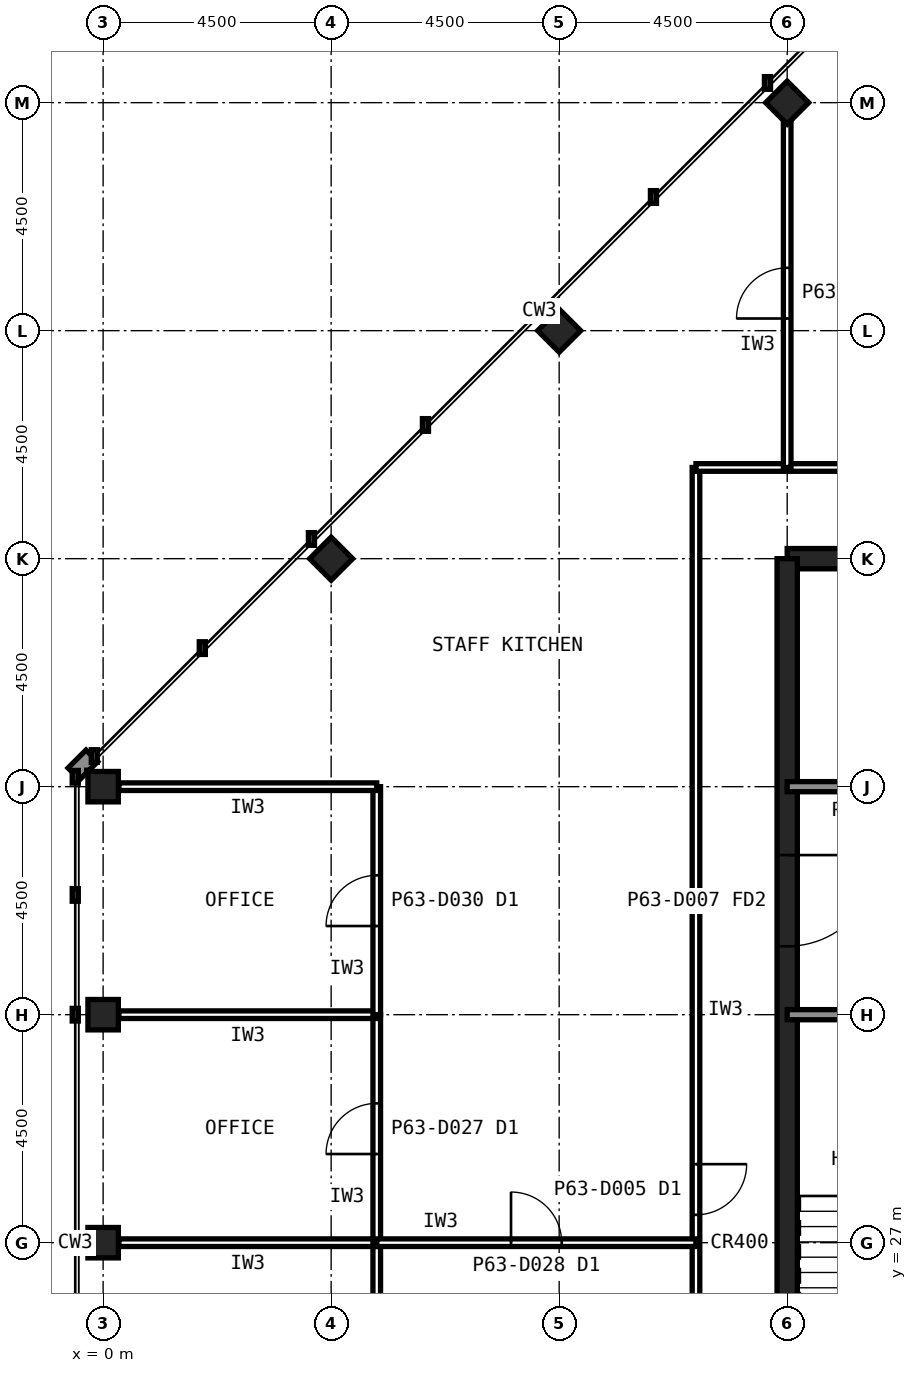
"""IFC4 building model, lengths in metres.
Left out: names, types, materials, properties, quantities, classifications, styles, units other than length and angle.
Written with IfcOpenShell. Run it as: python <this file> out.ifc"""

import sys

from ifc_helpers import new_model, si_unit, direction, frame, frame_2d, origin, origin_2d, place, context, subcontext, project, spatial, rectangle, hollow_rectangle, extrude, element, fill, save


model = new_model("IFC4")
c1 = context("Model", 3, precision=1e-05, world=origin(), true_north=direction((0.0, 1.0)))
c2 = subcontext(c1, "Body", "Model", "MODEL_VIEW")
j1 = project(units=[si_unit("LENGTHUNIT", "METRE"), si_unit("PLANEANGLEUNIT", "RADIAN")], contexts=[c1])
p1 = place(None, origin())
s1 = spatial("IfcSite", under=j1, at=p1, CompositionType="ELEMENT")
p2 = place(p1, origin())
s2 = spatial("IfcBuilding", under=s1, at=p2, CompositionType="ELEMENT")
p3 = place(p2, frame((0.0, 0.0, 262.6)))
s3 = spatial("IfcBuildingStorey", under=s2, at=p3, CompositionType="ELEMENT", Elevation=262.6)
for number, where, z_axis, x_axis in (
    (1, (0.0, 36.0, 0.0), (0.0, 0.0, 1.0), (1.0, 0.0, 0.0)),
    (2, (0.0, 31.5, 0.0), (0.0, 0.0, 1.0), (1.0, 0.0, 0.0)),
    (3, (0.0, 27.0, 0.0), (0.0, 0.0, 1.0), (1.0, 0.0, 0.0)),
    (4, (4.5, 40.5, 0.0), (0.0, 0.0, 1.0), (0.707, 0.707, 0.0)),
    (5, (9.0, 45.0, 0.0), (0.0, 0.0, 1.0), (0.707, 0.707, 0.0)),
    (6, (13.5, 49.5, 0.0), (0.0, 0.0, 1.0), (0.707, 0.707, 0.0)),
):
    element("IfcColumn", number, at=place(p3, frame(where, z_axis=z_axis, x_axis=x_axis)), inside=s3, PredefinedType="COLUMN", context=c2, shape_type="SweptSolid", body=[
        extrude(hollow_rectangle(XDim=0.6, YDim=0.6, WallThickness=0.028, at=origin_2d()), origin(), (0.0, 0.0, 1.0), 4.0),
    ])
p4 = place(p3, frame((40.5, 40.5, 0.0), z_axis=(0.0, 0.0, 1.0), x_axis=(-1.0, 0.0, 0.0)))
e7 = element("IfcWall", 7, at=p4, inside=s3, PredefinedType="SHEAR", context=c2, shape_type="SweptSolid", body=[
    extrude(rectangle(XDim=27.0, YDim=0.4, at=frame_2d((13.5, 0.0))), origin(), (0.0, 0.0, 1.0), 4.0),
])
p5 = place(p3, frame((13.5, 40.5, 0.0), z_axis=(0.0, 0.0, 1.0), x_axis=(0.0, -1.0, 0.0)))
e8 = element("IfcWall", 8, at=p5, inside=s3, PredefinedType="SHEAR", context=c2, shape_type="SweptSolid", body=[
    extrude(rectangle(XDim=27.0, YDim=0.4, at=frame_2d((13.5, 0.0))), origin(), (0.0, 0.0, 1.0), 4.0),
])
p6 = place(p5, frame((19.65, 0.0, 0.0)))
e9 = element("IfcOpeningElement", 9, at=p6, cuts=e8, PredefinedType="OPENING", context=c2, shape_type="SweptSolid", body=[
    extrude(rectangle(XDim=1.2, YDim=2.1, at=frame_2d((0.6, 1.05))), frame((0.0, 0.21, 0.0), z_axis=(0.0, -1.0, 0.0), x_axis=(1.0, 0.0, 0.0)), (0.0, 0.0, 1.0), 0.42),
])
p7 = place(p5, frame((5.85, 0.0, 0.0)))
e10 = element("IfcOpeningElement", 10, at=p7, cuts=e8, PredefinedType="OPENING", context=c2, shape_type="SweptSolid", body=[
    extrude(rectangle(XDim=1.8, YDim=2.1, at=frame_2d((0.9, 1.05))), frame((0.0, 0.21, 0.0), z_axis=(0.0, -1.0, 0.0), x_axis=(1.0, 0.0, 0.0)), (0.0, 0.0, 1.0), 0.42),
])
p8 = place(p3, frame((13.5, 36.0, 0.0), z_axis=(0.0, 0.0, 1.0), x_axis=(1.0, 0.0, 0.0)))
e11 = element("IfcWall", 11, at=p8, inside=s3, PredefinedType="SOLIDWALL", context=c2, shape_type="SweptSolid", body=[
    extrude(rectangle(XDim=27.0, YDim=0.2, at=frame_2d((13.5, 0.0))), origin(), (0.0, 0.0, 1.0), 3.84),
])
p9 = place(p8, frame((1.8, 0.0, 0.0)))
e12 = element("IfcOpeningElement", 12, at=p9, cuts=e11, PredefinedType="OPENING", context=c2, shape_type="SweptSolid", body=[
    extrude(rectangle(XDim=0.9, YDim=2.1, at=frame_2d((0.45, 1.05))), frame((0.0, 0.11, 0.0), z_axis=(0.0, -1.0, 0.0), x_axis=(1.0, 0.0, 0.0)), (0.0, 0.0, 1.0), 0.22),
])
p10 = place(p8, frame((5.55, 0.0, 0.0)))
e13 = element("IfcOpeningElement", 13, at=p10, cuts=e11, PredefinedType="OPENING", context=c2, shape_type="SweptSolid", body=[
    extrude(rectangle(XDim=0.9, YDim=2.1, at=frame_2d((0.45, 1.05))), frame((0.0, 0.11, 0.0), z_axis=(0.0, -1.0, 0.0), x_axis=(1.0, 0.0, 0.0)), (0.0, 0.0, 1.0), 0.22),
])
p11 = place(p8, frame((11.55, 0.0, 0.0)))
e14 = element("IfcOpeningElement", 14, at=p11, cuts=e11, PredefinedType="OPENING", context=c2, shape_type="SweptSolid", body=[
    extrude(rectangle(XDim=0.9, YDim=2.1, at=frame_2d((0.45, 1.05))), frame((0.0, 0.11, 0.0), z_axis=(0.0, -1.0, 0.0), x_axis=(1.0, 0.0, 0.0)), (0.0, 0.0, 1.0), 0.22),
])
p12 = place(p8, frame((14.55, 0.0, 0.0)))
e15 = element("IfcOpeningElement", 15, at=p12, cuts=e11, PredefinedType="OPENING", context=c2, shape_type="SweptSolid", body=[
    extrude(rectangle(XDim=0.9, YDim=2.1, at=frame_2d((0.45, 1.05))), frame((0.0, 0.11, 0.0), z_axis=(0.0, -1.0, 0.0), x_axis=(1.0, 0.0, 0.0)), (0.0, 0.0, 1.0), 0.22),
])
p13 = place(p8, frame((24.1, 0.0, 0.0)))
e16 = element("IfcOpeningElement", 16, at=p13, cuts=e11, PredefinedType="OPENING", context=c2, shape_type="SweptSolid", body=[
    extrude(rectangle(XDim=1.3, YDim=2.2, at=frame_2d((0.65, 1.1))), frame((0.0, 0.11, 0.0), z_axis=(0.0, -1.0, 0.0), x_axis=(1.0, 0.0, 0.0)), (0.0, 0.0, 1.0), 0.22),
])
p14 = place(p3, frame((13.5, 31.5, 0.0), z_axis=(0.0, 0.0, 1.0), x_axis=(1.0, 0.0, 0.0)))
e17 = element("IfcWall", 17, at=p14, inside=s3, PredefinedType="SOLIDWALL", context=c2, shape_type="SweptSolid", body=[
    extrude(rectangle(XDim=27.0, YDim=0.2, at=frame_2d((13.5, 0.0))), origin(), (0.0, 0.0, 1.0), 3.84),
])
p15 = place(p14, frame((24.15, 0.0, 0.0)))
e18 = element("IfcOpeningElement", 18, at=p15, cuts=e17, PredefinedType="OPENING", context=c2, shape_type="SweptSolid", body=[
    extrude(rectangle(XDim=1.2, YDim=2.1, at=frame_2d((0.6, 1.05))), frame((0.0, 0.11, 0.0), z_axis=(0.0, -1.0, 0.0), x_axis=(1.0, 0.0, 0.0)), (0.0, 0.0, 1.0), 0.22),
])
p16 = place(p14, frame((15.3, 0.0, 0.0)))
e19 = element("IfcOpeningElement", 19, at=p16, cuts=e17, PredefinedType="OPENING", context=c2, shape_type="SweptSolid", body=[
    extrude(rectangle(XDim=0.9, YDim=2.1, at=frame_2d((0.45, 1.05))), frame((0.0, 0.11, 0.0), z_axis=(0.0, -1.0, 0.0), x_axis=(1.0, 0.0, 0.0)), (0.0, 0.0, 1.0), 0.22),
])
p17 = place(p14, frame((19.8, 0.0, 0.0)))
e20 = element("IfcOpeningElement", 20, at=p17, cuts=e17, PredefinedType="OPENING", context=c2, shape_type="SweptSolid", body=[
    extrude(rectangle(XDim=0.9, YDim=2.1, at=frame_2d((0.45, 1.05))), frame((0.0, 0.11, 0.0), z_axis=(0.0, -1.0, 0.0), x_axis=(1.0, 0.0, 0.0)), (0.0, 0.0, 1.0), 0.22),
])
p18 = place(p3, frame((11.7, 42.3, 0.0), z_axis=(0.0, 0.0, 1.0), x_axis=(0.0, -1.0, 0.0)))
e21 = element("IfcWall", 21, at=p18, inside=s3, PredefinedType="PARTITIONING", context=c2, shape_type="SweptSolid", body=[
    extrude(rectangle(XDim=30.6, YDim=0.15, at=frame_2d((15.3, 0.0))), origin(), (0.0, 0.0, 1.0), 3.84),
])
p19 = place(p18, frame((13.75, 0.0, 0.0)))
e22 = element("IfcOpeningElement", 22, at=p19, cuts=e21, PredefinedType="OPENING", context=c2, shape_type="SweptSolid", body=[
    extrude(rectangle(XDim=1.0, YDim=2.1, at=frame_2d((0.5, 1.05))), frame((0.0, 0.085, 0.0), z_axis=(0.0, -1.0, 0.0), x_axis=(1.0, 0.0, 0.0)), (0.0, 0.0, 1.0), 0.17),
])
p20 = place(p3, frame((25.2, 42.3, 0.0), z_axis=(0.0, 0.0, 1.0), x_axis=(-1.0, 0.0, 0.0)))
e23 = element("IfcWall", 23, at=p20, inside=s3, PredefinedType="PARTITIONING", context=c2, shape_type="SweptSolid", body=[
    extrude(rectangle(XDim=13.5, YDim=0.15, at=frame_2d((6.75, 0.0))), origin(), (0.0, 0.0, 1.0), 3.84),
])
p21 = place(p20, frame((6.25, 0.0, 0.0)))
e24 = element("IfcOpeningElement", 24, at=p21, cuts=e23, PredefinedType="OPENING", context=c2, shape_type="SweptSolid", body=[
    extrude(rectangle(XDim=1.0, YDim=2.1, at=frame_2d((0.5, 1.05))), frame((0.0, 0.085, 0.0), z_axis=(0.0, -1.0, 0.0), x_axis=(1.0, 0.0, 0.0)), (0.0, 0.0, 1.0), 0.17),
])
p22 = place(p3, frame((5.4, 22.5, 0.0), z_axis=(0.0, 0.0, 1.0), x_axis=(0.0, 1.0, 0.0)))
e25 = element("IfcWall", 25, at=p22, inside=s3, PredefinedType="PARTITIONING", context=c2, shape_type="SweptSolid", body=[
    extrude(rectangle(XDim=4.5, YDim=0.15, at=frame_2d((2.25, 0.0))), origin(), (0.0, 0.0, 1.0), 3.84),
])
p23 = place(p22, frame((1.75, 0.0, 0.0)))
e26 = element("IfcOpeningElement", 26, at=p23, cuts=e25, PredefinedType="OPENING", context=c2, shape_type="SweptSolid", body=[
    extrude(rectangle(XDim=1.0, YDim=2.1, at=frame_2d((0.5, 1.05))), frame((0.0, 0.085, 0.0), z_axis=(0.0, -1.0, 0.0), x_axis=(1.0, 0.0, 0.0)), (0.0, 0.0, 1.0), 0.17),
])
p24 = place(p3, frame((5.4, 27.0, 0.0), z_axis=(0.0, 0.0, 1.0), x_axis=(-1.0, 0.0, 0.0)))
e27 = element("IfcWall", 27, at=p24, inside=s3, PredefinedType="PARTITIONING", context=c2, shape_type="SweptSolid", body=[
    extrude(rectangle(XDim=5.09, YDim=0.15, at=frame_2d((2.545, 0.0))), origin(), (0.0, 0.0, 1.0), 2.989),
])
p25 = place(p3, frame((5.4, 27.0, 0.0), z_axis=(0.0, 0.0, 1.0), x_axis=(0.0, 1.0, 0.0)))
e28 = element("IfcWall", 28, at=p25, inside=s3, PredefinedType="PARTITIONING", context=c2, shape_type="SweptSolid", body=[
    extrude(rectangle(XDim=4.5, YDim=0.15, at=frame_2d((2.25, 0.0))), origin(), (0.0, 0.0, 1.0), 3.84),
])
p26 = place(p25, frame((1.75, 0.0, 0.0)))
e29 = element("IfcOpeningElement", 29, at=p26, cuts=e28, PredefinedType="OPENING", context=c2, shape_type="SweptSolid", body=[
    extrude(rectangle(XDim=1.0, YDim=2.1, at=frame_2d((0.5, 1.05))), frame((0.0, 0.085, 0.0), z_axis=(0.0, -1.0, 0.0), x_axis=(1.0, 0.0, 0.0)), (0.0, 0.0, 1.0), 0.17),
])
p27 = place(p3, frame((5.4, 31.5, 0.0), z_axis=(0.0, 0.0, 1.0), x_axis=(-1.0, 0.0, 0.0)))
e30 = element("IfcWall", 30, at=p27, inside=s3, PredefinedType="PARTITIONING", context=c2, shape_type="SweptSolid", body=[
    extrude(rectangle(XDim=5.09, YDim=0.15, at=frame_2d((2.545, 0.0))), origin(), (0.0, 0.0, 1.0), 2.989),
])
p28 = place(p3, frame((5.4, 31.5, 0.0), z_axis=(0.0, 0.0, 1.0), x_axis=(0.0, 1.0, 0.0)))
e31 = element("IfcWall", 31, at=p28, inside=s3, PredefinedType="PARTITIONING", context=c2, shape_type="SweptSolid", body=[
    extrude(rectangle(XDim=4.5, YDim=0.15, at=frame_2d((2.25, 0.0))), origin(), (0.0, 0.0, 1.0), 3.84),
])
p29 = place(p28, frame((1.75, 0.0, 0.0)))
e32 = element("IfcOpeningElement", 32, at=p29, cuts=e31, PredefinedType="OPENING", context=c2, shape_type="SweptSolid", body=[
    extrude(rectangle(XDim=1.0, YDim=2.1, at=frame_2d((0.5, 1.05))), frame((0.0, 0.085, 0.0), z_axis=(0.0, -1.0, 0.0), x_axis=(1.0, 0.0, 0.0)), (0.0, 0.0, 1.0), 0.17),
])
p30 = place(p3, frame((5.4, 36.0, 0.0), z_axis=(0.0, 0.0, 1.0), x_axis=(-1.0, 0.0, 0.0)))
e33 = element("IfcWall", 33, at=p30, inside=s3, PredefinedType="PARTITIONING", context=c2, shape_type="SweptSolid", body=[
    extrude(rectangle(XDim=5.09, YDim=0.15, at=frame_2d((2.545, 0.0))), origin(), (0.0, 0.0, 1.0), 2.989),
])
p31 = place(p3, frame((13.5, 42.3, 0.0), z_axis=(0.0, 0.0, 1.0), x_axis=(0.0, 1.0, 0.0)))
e34 = element("IfcWall", 34, at=p31, inside=s3, PredefinedType="PARTITIONING", context=c2, shape_type="SweptSolid", body=[
    extrude(rectangle(XDim=6.88, YDim=0.15, at=frame_2d((3.44, 0.0))), origin(), (0.0, 0.0, 1.0), 2.989),
])
p32 = place(p31, frame((2.94, 0.0, 0.0)))
e35 = element("IfcOpeningElement", 35, at=p32, cuts=e34, PredefinedType="OPENING", context=c2, shape_type="SweptSolid", body=[
    extrude(rectangle(XDim=1.0, YDim=2.1, at=frame_2d((0.5, 1.05))), frame((0.0, 0.085, 0.0), z_axis=(0.0, -1.0, 0.0), x_axis=(1.0, 0.0, 0.0)), (0.0, 0.0, 1.0), 0.17),
])
p33 = place(p3, frame((5.4, 27.0, 0.0), z_axis=(0.0, 0.0, 1.0), x_axis=(1.0, 0.0, 0.0)))
e36 = element("IfcWall", 36, at=p33, inside=s3, PredefinedType="PARTITIONING", context=c2, shape_type="SweptSolid", body=[
    extrude(rectangle(XDim=6.3, YDim=0.15, at=frame_2d((3.15, 0.0))), origin(), (0.0, 0.0, 1.0), 2.989),
])
p34 = place(p33, frame((2.65, 0.0, 0.0)))
e37 = element("IfcOpeningElement", 37, at=p34, cuts=e36, PredefinedType="OPENING", context=c2, shape_type="SweptSolid", body=[
    extrude(rectangle(XDim=1.0, YDim=2.1, at=frame_2d((0.5, 1.05))), frame((0.0, 0.085, 0.0), z_axis=(0.0, -1.0, 0.0), x_axis=(1.0, 0.0, 0.0)), (0.0, 0.0, 1.0), 0.17),
])
p35 = place(p7, origin())
e38 = element("IfcDoor", 38, at=p35, inside=s3, OperationType="SINGLE_SWING_LEFT", PredefinedType="DOOR", context=c2, shape_type="SweptSolid", body=[
    extrude(rectangle(XDim=1.8, YDim=2.1, at=frame_2d((0.9, 1.05))), frame((0.0, 0.025, 0.0), z_axis=(0.0, -1.0, 0.0), x_axis=(1.0, 0.0, 0.0)), (0.0, 0.0, 1.0), 0.05),
])
fill(e10, e38)
p36 = place(p19, origin())
e39 = element("IfcDoor", 39, at=p36, inside=s3, OperationType="SINGLE_SWING_LEFT", PredefinedType="DOOR", context=c2, shape_type="SweptSolid", body=[
    extrude(rectangle(XDim=1.0, YDim=2.1, at=frame_2d((0.5, 1.05))), frame((0.0, 0.025, 0.0), z_axis=(0.0, -1.0, 0.0), x_axis=(1.0, 0.0, 0.0)), (0.0, 0.0, 1.0), 0.05),
])
fill(e22, e39)
p37 = place(p26, origin())
e40 = element("IfcDoor", 40, at=p37, inside=s3, OperationType="SINGLE_SWING_LEFT", PredefinedType="DOOR", context=c2, shape_type="SweptSolid", body=[
    extrude(rectangle(XDim=1.0, YDim=2.1, at=frame_2d((0.5, 1.05))), frame((0.0, 0.025, 0.0), z_axis=(0.0, -1.0, 0.0), x_axis=(1.0, 0.0, 0.0)), (0.0, 0.0, 1.0), 0.05),
])
fill(e29, e40)
p38 = place(p29, origin())
e41 = element("IfcDoor", 41, at=p38, inside=s3, OperationType="SINGLE_SWING_LEFT", PredefinedType="DOOR", context=c2, shape_type="SweptSolid", body=[
    extrude(rectangle(XDim=1.0, YDim=2.1, at=frame_2d((0.5, 1.05))), frame((0.0, 0.025, 0.0), z_axis=(0.0, -1.0, 0.0), x_axis=(1.0, 0.0, 0.0)), (0.0, 0.0, 1.0), 0.05),
])
fill(e32, e41)
p39 = place(p32, origin())
e42 = element("IfcDoor", 42, at=p39, inside=s3, OperationType="SINGLE_SWING_LEFT", PredefinedType="DOOR", context=c2, shape_type="SweptSolid", body=[
    extrude(rectangle(XDim=1.0, YDim=2.1, at=frame_2d((0.5, 1.05))), frame((0.0, 0.025, 0.0), z_axis=(0.0, -1.0, 0.0), x_axis=(1.0, 0.0, 0.0)), (0.0, 0.0, 1.0), 0.05),
])
fill(e35, e42)
p40 = place(p34, origin())
e43 = element("IfcDoor", 43, at=p40, inside=s3, OperationType="SINGLE_SWING_LEFT", PredefinedType="DOOR", context=c2, shape_type="SweptSolid", body=[
    extrude(rectangle(XDim=1.0, YDim=2.1, at=frame_2d((0.5, 1.05))), frame((0.0, 0.025, 0.0), z_axis=(0.0, -1.0, 0.0), x_axis=(1.0, 0.0, 0.0)), (0.0, 0.0, 1.0), 0.05),
])
fill(e37, e43)
save(model, sys.argv[1])
